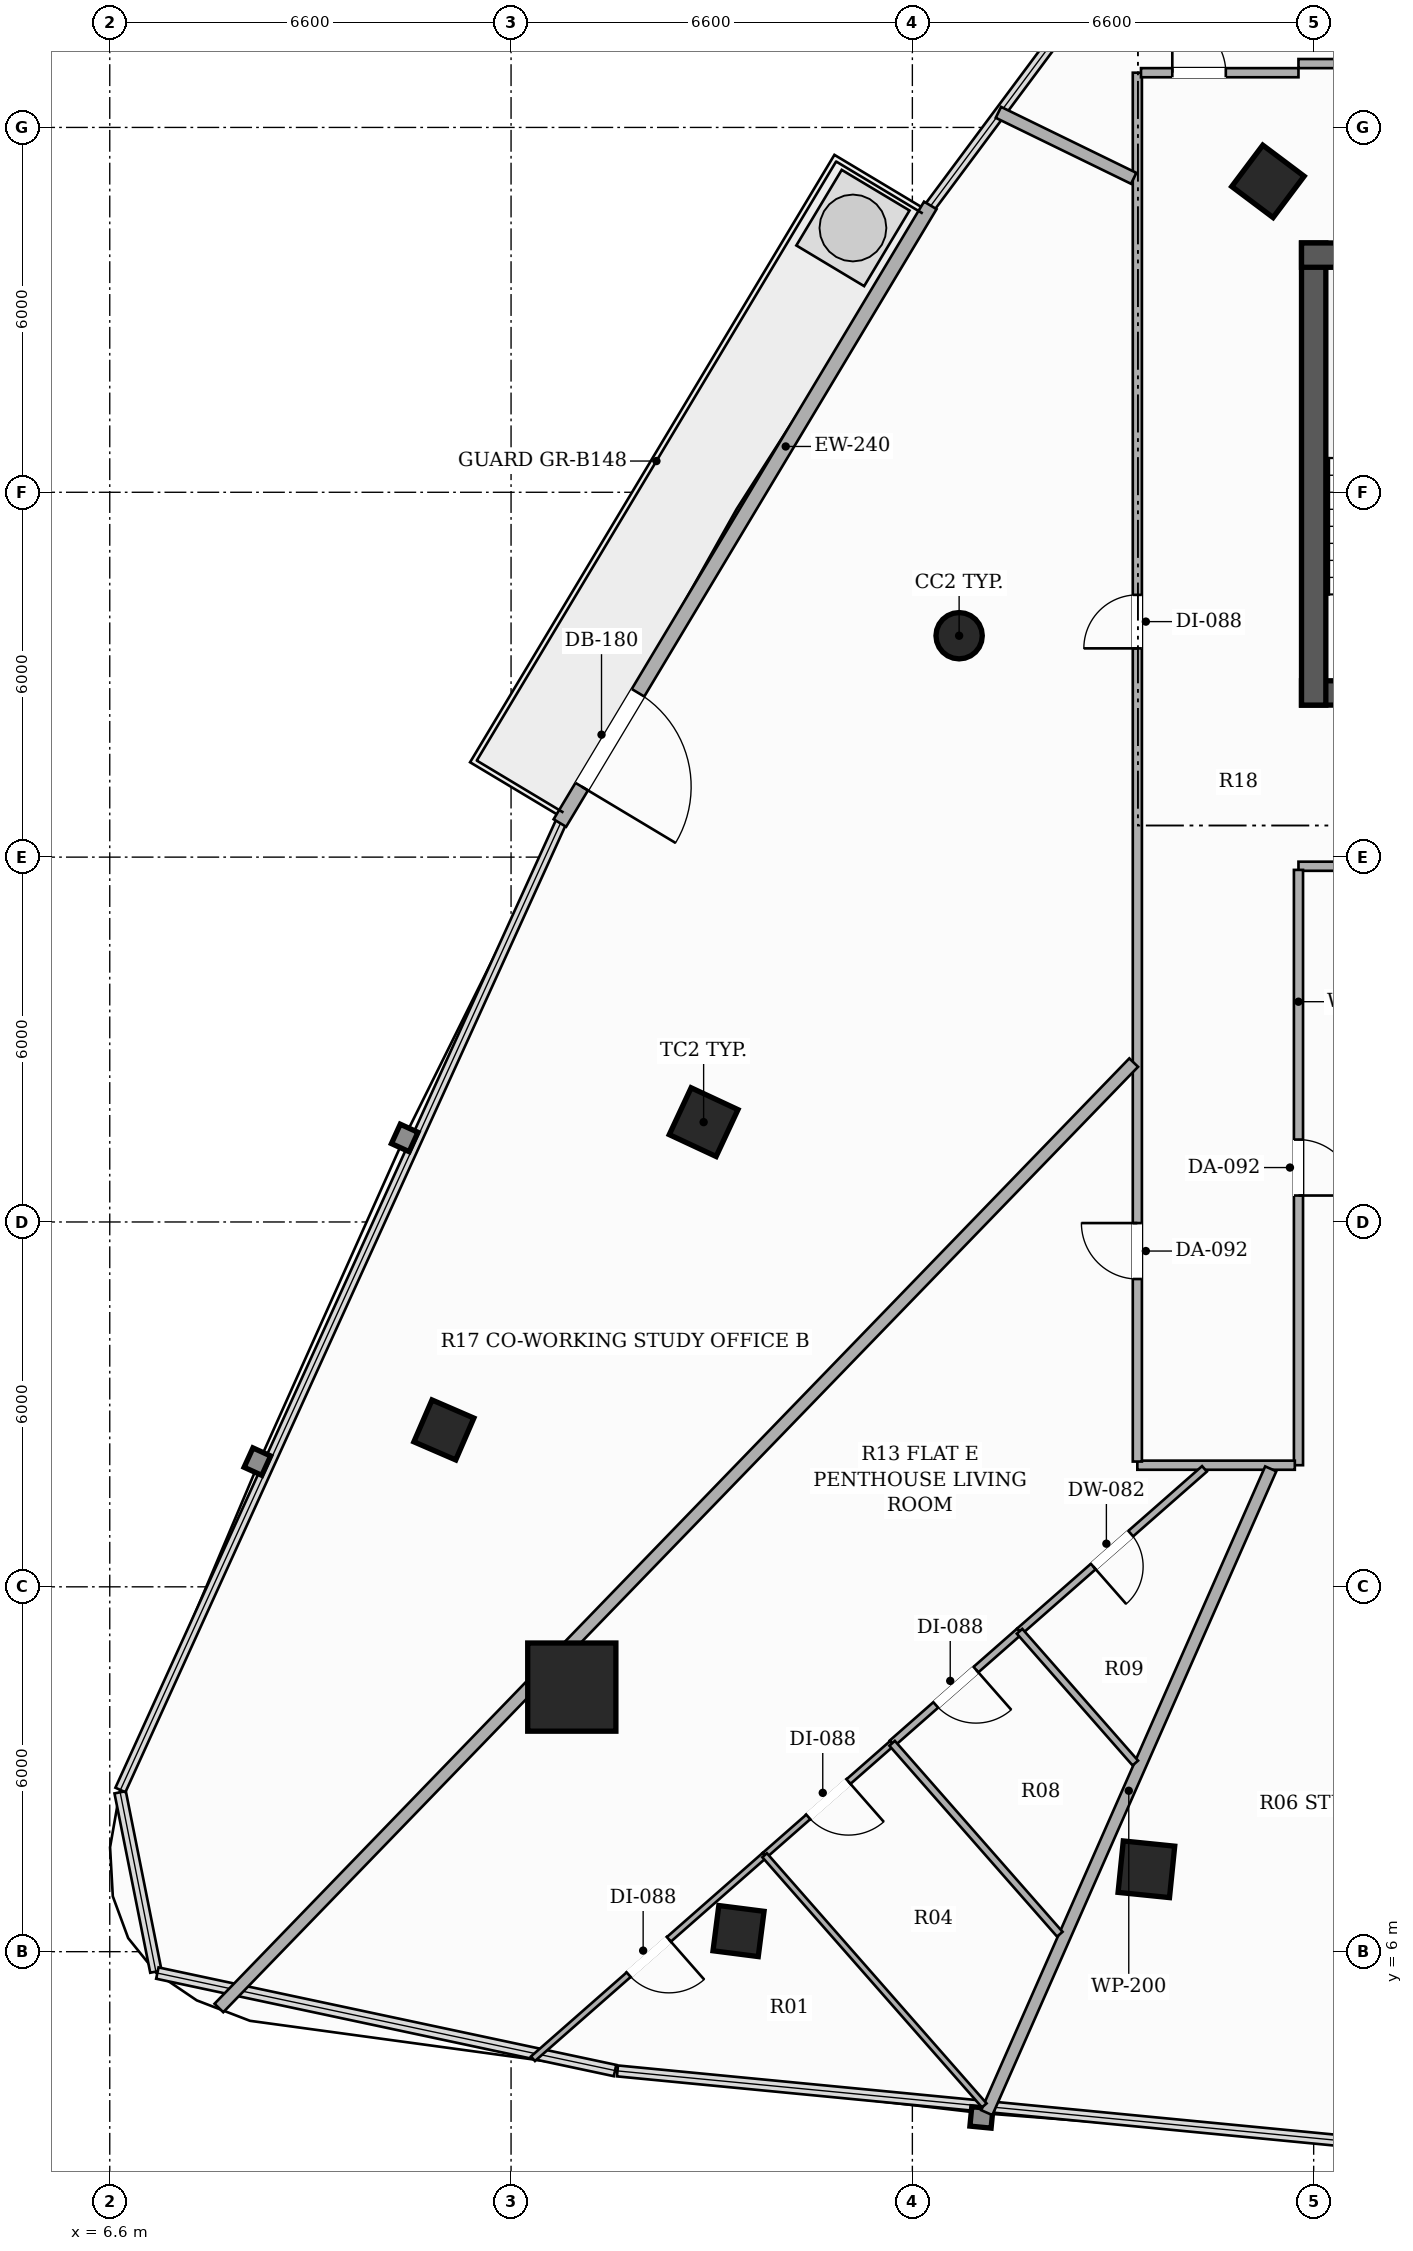
"""IFC4 building model, lengths in metres.
Left out: names, types, materials, properties, quantities, classifications, styles, units other than length and angle.
Written with IfcOpenShell. Run it as: python <this file> out.ifc"""

import sys

from ifc_helpers import new_model, si_unit, direction, frame, frame_2d, origin, origin_2d, place, context, subcontext, project, spatial, rectangle, hollow_rectangle, hollow_circle, extrude, element, fill, save


model = new_model("IFC4")
c1 = context("Model", 3, precision=1e-05, world=origin(), true_north=direction((0.0, 1.0)))
c2 = subcontext(c1, "Body", "Model", "MODEL_VIEW")
j1 = project(units=[si_unit("LENGTHUNIT", "METRE"), si_unit("PLANEANGLEUNIT", "RADIAN")], contexts=[c1])
p1 = place(None, origin())
s1 = spatial("IfcSite", under=j1, at=p1, CompositionType="ELEMENT")
p2 = place(p1, origin())
s2 = spatial("IfcBuilding", under=s1, at=p2, CompositionType="ELEMENT")
p3 = place(p2, frame((0.0, 0.0, 113.3)))
s3 = spatial("IfcBuildingStorey", under=s2, at=p3, CompositionType="ELEMENT", Elevation=113.3)
p4 = place(p3, frame((26.2, 26.7, 0.0), z_axis=(0.0, 0.0, 1.0), x_axis=(1.0, 0.0, 0.0)))
e1 = element("IfcWall", 1, at=p4, inside=s3, PredefinedType="SHEAR", context=c2, shape_type="SweptSolid", body=[
    extrude(rectangle(XDim=13.6, YDim=0.4, at=frame_2d((6.8, 0.0))), origin(), (0.0, 0.0, 1.0), 3.3),
])
p5 = place(p4, frame((4.35, 0.0, 0.0)))
e2 = element("IfcOpeningElement", 2, at=p5, cuts=e1, PredefinedType="OPENING", context=c2, shape_type="SweptSolid", body=[
    extrude(rectangle(XDim=1.05, YDim=2.15, at=frame_2d((0.525, 1.075))), frame((0.0, 0.21, 0.0), z_axis=(0.0, -1.0, 0.0), x_axis=(1.0, 0.0, 0.0)), (0.0, 0.0, 1.0), 0.42),
])
p6 = place(p4, frame((8.3, 0.0, 0.0)))
e3 = element("IfcOpeningElement", 3, at=p6, cuts=e1, PredefinedType="OPENING", context=c2, shape_type="SweptSolid", body=[
    extrude(rectangle(XDim=1.05, YDim=2.15, at=frame_2d((0.525, 1.075))), frame((0.0, 0.21, 0.0), z_axis=(0.0, -1.0, 0.0), x_axis=(1.0, 0.0, 0.0)), (0.0, 0.0, 1.0), 0.42),
])
p7 = place(p3, frame((26.4, 26.5, 0.0), z_axis=(0.0, 0.0, 1.0), x_axis=(0.0, 1.0, 0.0)))
e4 = element("IfcWall", 4, at=p7, inside=s3, PredefinedType="SHEAR", context=c2, shape_type="SweptSolid", body=[
    extrude(rectangle(XDim=7.6, YDim=0.4, at=frame_2d((3.8, 0.0))), origin(), (0.0, 0.0, 1.0), 3.3),
])
p8 = place(p3, frame((26.2, 33.9, 0.0), z_axis=(0.0, 0.0, 1.0), x_axis=(1.0, 0.0, 0.0)))
e5 = element("IfcWall", 5, at=p8, inside=s3, PredefinedType="SHEAR", context=c2, shape_type="SweptSolid", body=[
    extrude(rectangle(XDim=3.68, YDim=0.4, at=frame_2d((1.84, 0.0))), origin(), (0.0, 0.0, 1.0), 3.3),
])
p9 = place(p3, frame((14.199, 10.351, 0.0), z_axis=(0.0, 0.0, 1.0), x_axis=(1.0, 0.0, 0.0)))
e6 = element("IfcColumn", 6, at=p9, inside=s3, PredefinedType="COLUMN", context=c2, shape_type="SweptSolid", body=[
    extrude(hollow_rectangle(XDim=1.45, YDim=1.45, WallThickness=0.045, at=origin_2d()), origin(), (0.0, 0.0, 1.0), 3.3),
])
p10 = place(p3, frame((25.648, 35.113, 0.0), z_axis=(0.0, 0.0, 1.0), x_axis=(0.600420225326, 0.799684658487, 0.0)))
e7 = element("IfcColumn", 7, at=p10, inside=s3, PredefinedType="COLUMN", context=c2, shape_type="SweptSolid", body=[
    extrude(hollow_rectangle(XDim=0.85, YDim=0.85, WallThickness=0.028, at=origin_2d()), origin(), (0.0, 0.0, 1.0), 3.3),
])
p11 = place(p3, frame((20.569, 27.641, 0.0), z_axis=(0.0, 0.0, 1.0), x_axis=(1.0, 0.0, 0.0)))
e8 = element("IfcColumn", 8, at=p11, inside=s3, PredefinedType="COLUMN", context=c2, shape_type="SweptSolid", body=[
    extrude(hollow_circle(Radius=0.381, WallThickness=0.022, at=origin_2d()), origin(), (0.0, 0.0, 1.0), 3.3),
])
for number, where, z_axis, x_axis in (
    (9, (16.367, 19.642, 0.0), (0.0, 0.0, 1.0), (0.423, 0.906, 0.0)),
    (10, (23.649, 7.355, 0.0), (0.0, 0.0, 1.0), (-0.995, 0.101, 0.0)),
):
    element("IfcColumn", number, at=place(p3, frame(where, z_axis=z_axis, x_axis=x_axis)), inside=s3, PredefinedType="COLUMN", context=c2, shape_type="SweptSolid", body=[
        extrude(hollow_rectangle(XDim=0.85, YDim=0.85, WallThickness=0.028, at=origin_2d()), origin(), (0.0, 0.0, 1.0), 3.3),
    ])
for number, where, z_axis, x_axis in (
    (11, (12.095, 14.58, 0.0), (0.0, 0.0, 1.0), (0.397, 0.918, 0.0)),
    (12, (16.941, 6.339, 0.0), (0.0, 0.0, 1.0), (-0.992, 0.127, 0.0)),
):
    element("IfcColumn", number, at=place(p3, frame(where, z_axis=z_axis, x_axis=x_axis)), inside=s3, PredefinedType="COLUMN", context=c2, shape_type="SweptSolid", body=[
        extrude(hollow_rectangle(XDim=0.75, YDim=0.75, WallThickness=0.025, at=origin_2d()), origin(), (0.0, 0.0, 1.0), 3.3),
    ])
p12 = place(p3, frame((20.095, 34.718, 0.0), z_axis=(0.0, 0.0, 1.0), x_axis=(-0.514362369366, -0.857572943242, 0.0)))
e13 = element("IfcWall", 13, at=p12, inside=s3, PredefinedType="SOLIDWALL", context=c2, shape_type="SweptSolid", body=[
    extrude(rectangle(XDim=11.844, YDim=0.24, at=frame_2d((5.922, 0.0))), origin(), (0.0, 0.0, 1.0), 2.624),
])
p13 = place(p12, frame((9.346, 0.0, 0.0)))
e14 = element("IfcOpeningElement", 14, at=p13, cuts=e13, PredefinedType="OPENING", context=c2, shape_type="SweptSolid", body=[
    extrude(rectangle(XDim=1.8, YDim=2.2, at=frame_2d((0.9, 1.1))), frame((0.0, 0.13, 0.0), z_axis=(0.0, -1.0, 0.0), x_axis=(1.0, 0.0, 0.0)), (0.0, 0.0, 1.0), 0.26),
])
p14 = place(p3, frame((31.775, 23.85, 0.0), z_axis=(0.0, 0.0, 1.0), x_axis=(-1.0, 0.0, 0.0)))
e15 = element("IfcWall", 15, at=p14, inside=s3, PredefinedType="PARTITIONING", context=c2, shape_type="SweptSolid", body=[
    extrude(rectangle(XDim=5.625, YDim=0.15, at=frame_2d((2.812, 0.0))), origin(), (0.0, 0.0, 1.0), 2.721),
])
p15 = place(p3, frame((26.15, 23.79, 0.0), z_axis=(0.0, 0.0, 1.0), x_axis=(0.0, -1.0, 0.0)))
e16 = element("IfcWall", 16, at=p15, inside=s3, PredefinedType="PARTITIONING", context=c2, shape_type="SweptSolid", body=[
    extrude(rectangle(XDim=9.79, YDim=0.15, at=frame_2d((4.895, 0.0))), origin(), (0.0, 0.0, 1.0), 2.721),
])
p16 = place(p15, frame((4.435, 0.0, 0.0)))
e17 = element("IfcOpeningElement", 17, at=p16, cuts=e16, PredefinedType="OPENING", context=c2, shape_type="SweptSolid", body=[
    extrude(rectangle(XDim=0.92, YDim=2.15, at=frame_2d((0.46, 1.075))), frame((0.0, 0.085, 0.0), z_axis=(0.0, -1.0, 0.0), x_axis=(1.0, 0.0, 0.0)), (0.0, 0.0, 1.0), 0.17),
])
p17 = place(p3, frame((26.09, 14.0, 0.0), z_axis=(0.0, 0.0, 1.0), x_axis=(-1.0, 0.0, 0.0)))
e18 = element("IfcWall", 18, at=p17, inside=s3, PredefinedType="PARTITIONING", context=c2, shape_type="SweptSolid", body=[
    extrude(rectangle(XDim=2.59, YDim=0.15, at=frame_2d((1.295, 0.0))), origin(), (0.0, 0.0, 1.0), 2.721),
])
p18 = place(p3, frame((23.5, 14.06, 0.0), z_axis=(0.0, 0.0, 1.0), x_axis=(0.0, 1.0, 0.0)))
e19 = element("IfcWall", 19, at=p18, inside=s3, PredefinedType="PARTITIONING", context=c2, shape_type="SweptSolid", body=[
    extrude(rectangle(XDim=22.84, YDim=0.15, at=frame_2d((11.42, 0.0))), origin(), (0.0, 0.0, 1.0), 2.413),
])
p19 = place(p18, frame((13.373, 0.0, 0.0)))
e20 = element("IfcOpeningElement", 20, at=p19, cuts=e19, PredefinedType="OPENING", context=c2, shape_type="SweptSolid", body=[
    extrude(rectangle(XDim=0.88, YDim=2.1, at=frame_2d((0.44, 1.05))), frame((0.0, 0.085, 0.0), z_axis=(0.0, -1.0, 0.0), x_axis=(1.0, 0.0, 0.0)), (0.0, 0.0, 1.0), 0.17),
])
p20 = place(p18, frame((3.002, 0.0, 0.0)))
e21 = element("IfcOpeningElement", 21, at=p20, cuts=e19, PredefinedType="OPENING", context=c2, shape_type="SweptSolid", body=[
    extrude(rectangle(XDim=0.92, YDim=2.15, at=frame_2d((0.46, 1.075))), frame((0.0, 0.085, 0.0), z_axis=(0.0, -1.0, 0.0), x_axis=(1.0, 0.0, 0.0)), (0.0, 0.0, 1.0), 0.17),
])
p21 = place(p3, frame((23.56, 36.9, 0.0), z_axis=(0.0, 0.0, 1.0), x_axis=(1.0, 0.0, 0.0)))
e22 = element("IfcWall", 22, at=p21, inside=s3, PredefinedType="PARTITIONING", context=c2, shape_type="SweptSolid", body=[
    extrude(rectangle(XDim=2.59, YDim=0.15, at=frame_2d((1.295, 0.0))), origin(), (0.0, 0.0, 1.0), 2.413),
])
p22 = place(p21, frame((0.515, 0.0, 0.0)))
e23 = element("IfcOpeningElement", 23, at=p22, cuts=e22, PredefinedType="OPENING", context=c2, shape_type="SweptSolid", body=[
    extrude(rectangle(XDim=0.88, YDim=2.1, at=frame_2d((0.44, 1.05))), frame((0.0, 0.085, 0.0), z_axis=(0.0, -1.0, 0.0), x_axis=(1.0, 0.0, 0.0)), (0.0, 0.0, 1.0), 0.17),
])
p23 = place(p3, frame((26.15, 37.05, 0.0), z_axis=(0.0, 0.0, 1.0), x_axis=(1.0, 0.0, 0.0)))
e24 = element("IfcWall", 24, at=p23, inside=s3, PredefinedType="PARTITIONING", context=c2, shape_type="SweptSolid", body=[
    extrude(rectangle(XDim=2.0, YDim=0.15, at=frame_2d((1.0, 0.0))), origin(), (0.0, 0.0, 1.0), 2.413),
])
p24 = place(p3, frame((21.024, 3.353, 0.0), z_axis=(0.0, 0.0, 1.0), x_axis=(0.403601766718, 0.914934759369, 0.0)))
e25 = element("IfcWall", 25, at=p24, inside=s3, PredefinedType="PARTITIONING", context=c2, shape_type="SweptSolid", body=[
    extrude(rectangle(XDim=11.571, YDim=0.2, at=frame_2d((5.786, 0.0))), origin(), (0.0, 0.0, 1.0), 2.413),
])
p25 = place(p3, frame((23.44, 20.621, 0.0), z_axis=(0.0, 0.0, 1.0), x_axis=(-0.695405261367, -0.718617786075, 0.0)))
e26 = element("IfcWall", 26, at=p25, inside=s3, PredefinedType="PARTITIONING", context=c2, shape_type="SweptSolid", body=[
    extrude(rectangle(XDim=21.635, YDim=0.2, at=frame_2d((10.817, 0.0))), origin(), (0.0, 0.0, 1.0), 2.413),
])
p26 = place(p3, frame((21.215, 36.248, 0.0), z_axis=(0.0, 0.0, 1.0), x_axis=(0.898821522371, -0.438314808012, 0.0)))
e27 = element("IfcWall", 27, at=p26, inside=s3, PredefinedType="PARTITIONING", context=c2, shape_type="SweptSolid", body=[
    extrude(rectangle(XDim=2.475, YDim=0.2, at=frame_2d((1.238, 0.0))), origin(), (0.0, 0.0, 1.0), 3.06),
])
p27 = place(p3, frame((24.604, 13.94, 0.0), z_axis=(0.0, 0.0, 1.0), x_axis=(-0.751349767919, -0.659904179595, 0.0)))
e28 = element("IfcWall", 28, at=p27, inside=s3, PredefinedType="PARTITIONING", context=c2, shape_type="SweptSolid", body=[
    extrude(rectangle(XDim=4.047, YDim=0.12, at=frame_2d((2.024, 0.0))), origin(), (0.0, 0.0, 1.0), 2.721),
])
p28 = place(p27, frame((1.614, 0.0, 0.0)))
e29 = element("IfcOpeningElement", 29, at=p28, cuts=e28, PredefinedType="OPENING", context=c2, shape_type="SweptSolid", body=[
    extrude(rectangle(XDim=0.82, YDim=2.1, at=frame_2d((0.41, 1.05))), frame((0.0, 0.07, 0.0), z_axis=(0.0, -1.0, 0.0), x_axis=(1.0, 0.0, 0.0)), (0.0, 0.0, 1.0), 0.14),
])
p29 = place(p3, frame((21.563, 11.269, 0.0), z_axis=(0.0, 0.0, 1.0), x_axis=(-0.751138604229, -0.660144527537, 0.0)))
e30 = element("IfcWall", 30, at=p29, inside=s3, PredefinedType="PARTITIONING", context=c2, shape_type="SweptSolid", body=[
    extrude(rectangle(XDim=2.79, YDim=0.12, at=frame_2d((1.395, 0.0))), origin(), (0.0, 0.0, 1.0), 2.721),
])
p30 = place(p29, frame((0.955, 0.0, 0.0)))
e31 = element("IfcOpeningElement", 31, at=p30, cuts=e30, PredefinedType="OPENING", context=c2, shape_type="SweptSolid", body=[
    extrude(rectangle(XDim=0.88, YDim=2.1, at=frame_2d((0.44, 1.05))), frame((0.0, 0.07, 0.0), z_axis=(0.0, -1.0, 0.0), x_axis=(1.0, 0.0, 0.0)), (0.0, 0.0, 1.0), 0.14),
])
p31 = place(p3, frame((17.37, 7.586, 0.0), z_axis=(0.0, 0.0, 1.0), x_axis=(-0.751292920188, -0.659968899324, 0.0)))
e32 = element("IfcWall", 32, at=p31, inside=s3, PredefinedType="PARTITIONING", context=c2, shape_type="SweptSolid", body=[
    extrude(rectangle(XDim=5.071, YDim=0.1, at=frame_2d((2.536, 0.0))), origin(), (0.0, 0.0, 1.0), 2.413),
])
p32 = place(p31, frame((2.096, 0.0, 0.0)))
e33 = element("IfcOpeningElement", 33, at=p32, cuts=e32, PredefinedType="OPENING", context=c2, shape_type="SweptSolid", body=[
    extrude(rectangle(XDim=0.88, YDim=2.1, at=frame_2d((0.44, 1.05))), frame((0.0, 0.06, 0.0), z_axis=(0.0, -1.0, 0.0), x_axis=(1.0, 0.0, 0.0)), (0.0, 0.0, 1.0), 0.12),
])
p33 = place(p3, frame((19.467, 9.427, 0.0), z_axis=(0.0, 0.0, 1.0), x_axis=(-0.751464558758, -0.659773458795, 0.0)))
e34 = element("IfcWall", 34, at=p33, inside=s3, PredefinedType="PARTITIONING", context=c2, shape_type="SweptSolid", body=[
    extrude(rectangle(XDim=2.791, YDim=0.1, at=frame_2d((1.395, 0.0))), origin(), (0.0, 0.0, 1.0), 2.721),
])
p34 = place(p33, frame((0.955, 0.0, 0.0)))
e35 = element("IfcOpeningElement", 35, at=p34, cuts=e34, PredefinedType="OPENING", context=c2, shape_type="SweptSolid", body=[
    extrude(rectangle(XDim=0.88, YDim=2.1, at=frame_2d((0.44, 1.05))), frame((0.0, 0.06, 0.0), z_axis=(0.0, -1.0, 0.0), x_axis=(1.0, 0.0, 0.0)), (0.0, 0.0, 1.0), 0.12),
])
p35 = place(p3, frame((23.467, 9.102, 0.0), z_axis=(0.0, 0.0, 1.0), x_axis=(-0.660061062947, 0.751211949573, 0.0)))
e36 = element("IfcWall", 36, at=p35, inside=s3, PredefinedType="PARTITIONING", context=c2, shape_type="SweptSolid", body=[
    extrude(rectangle(XDim=2.885, YDim=0.12, at=frame_2d((1.442, 0.0))), origin(), (0.0, 0.0, 1.0), 2.721),
])
p36 = place(p3, frame((22.225, 6.287, 0.0), z_axis=(0.0, 0.0, 1.0), x_axis=(-0.659946783628, 0.751312347016, 0.0)))
e37 = element("IfcWall", 37, at=p36, inside=s3, PredefinedType="PARTITIONING", context=c2, shape_type="SweptSolid", body=[
    extrude(rectangle(XDim=4.179, YDim=0.12, at=frame_2d((2.09, 0.0))), origin(), (0.0, 0.0, 1.0), 2.413),
])
p37 = place(p3, frame((17.37, 7.586, 0.0), z_axis=(0.0, 0.0, 1.0), x_axis=(0.659851528992, -0.751396007234, 0.0)))
e38 = element("IfcWall", 38, at=p37, inside=s3, PredefinedType="PARTITIONING", context=c2, shape_type="SweptSolid", body=[
    extrude(rectangle(XDim=5.475, YDim=0.1, at=frame_2d((2.738, 0.0))), origin(), (0.0, 0.0, 1.0), 2.413),
])
p38 = place(p13, origin())
e39 = element("IfcDoor", 39, at=p38, inside=s3, OperationType="SINGLE_SWING_RIGHT", PredefinedType="DOOR", context=c2, shape_type="SweptSolid", body=[
    extrude(rectangle(XDim=1.8, YDim=2.2, at=frame_2d((0.9, 1.1))), frame((0.0, 0.025, 0.0), z_axis=(0.0, -1.0, 0.0), x_axis=(1.0, 0.0, 0.0)), (0.0, 0.0, 1.0), 0.05),
])
fill(e14, e39)
p39 = place(p16, origin())
e40 = element("IfcDoor", 40, at=p39, inside=s3, OperationType="SINGLE_SWING_RIGHT", PredefinedType="DOOR", context=c2, shape_type="SweptSolid", body=[
    extrude(rectangle(XDim=0.92, YDim=2.15, at=frame_2d((0.46, 1.075))), frame((0.0, 0.025, 0.0), z_axis=(0.0, -1.0, 0.0), x_axis=(1.0, 0.0, 0.0)), (0.0, 0.0, 1.0), 0.05),
])
fill(e17, e40)
p40 = place(p19, origin())
e41 = element("IfcDoor", 41, at=p40, inside=s3, OperationType="SINGLE_SWING_LEFT", PredefinedType="DOOR", context=c2, shape_type="SweptSolid", body=[
    extrude(rectangle(XDim=0.88, YDim=2.1, at=frame_2d((0.44, 1.05))), frame((0.0, 0.025, 0.0), z_axis=(0.0, -1.0, 0.0), x_axis=(1.0, 0.0, 0.0)), (0.0, 0.0, 1.0), 0.05),
])
fill(e20, e41)
p41 = place(p20, origin())
e42 = element("IfcDoor", 42, at=p41, inside=s3, OperationType="SINGLE_SWING_RIGHT", PredefinedType="DOOR", context=c2, shape_type="SweptSolid", body=[
    extrude(rectangle(XDim=0.92, YDim=2.15, at=frame_2d((0.46, 1.075))), frame((0.0, 0.025, 0.0), z_axis=(0.0, -1.0, 0.0), x_axis=(1.0, 0.0, 0.0)), (0.0, 0.0, 1.0), 0.05),
])
fill(e21, e42)
p42 = place(p28, origin())
e43 = element("IfcDoor", 43, at=p42, inside=s3, OperationType="SINGLE_SWING_RIGHT", PredefinedType="DOOR", context=c2, shape_type="SweptSolid", body=[
    extrude(rectangle(XDim=0.82, YDim=2.1, at=frame_2d((0.41, 1.05))), frame((0.0, 0.025, 0.0), z_axis=(0.0, -1.0, 0.0), x_axis=(1.0, 0.0, 0.0)), (0.0, 0.0, 1.0), 0.05),
])
fill(e29, e43)
p43 = place(p30, origin())
e44 = element("IfcDoor", 44, at=p43, inside=s3, OperationType="SINGLE_SWING_LEFT", PredefinedType="DOOR", context=c2, shape_type="SweptSolid", body=[
    extrude(rectangle(XDim=0.88, YDim=2.1, at=frame_2d((0.44, 1.05))), frame((0.0, 0.025, 0.0), z_axis=(0.0, -1.0, 0.0), x_axis=(1.0, 0.0, 0.0)), (0.0, 0.0, 1.0), 0.05),
])
fill(e31, e44)
p44 = place(p32, origin())
e45 = element("IfcDoor", 45, at=p44, inside=s3, OperationType="SINGLE_SWING_LEFT", PredefinedType="DOOR", context=c2, shape_type="SweptSolid", body=[
    extrude(rectangle(XDim=0.88, YDim=2.1, at=frame_2d((0.44, 1.05))), frame((0.0, 0.025, 0.0), z_axis=(0.0, -1.0, 0.0), x_axis=(1.0, 0.0, 0.0)), (0.0, 0.0, 1.0), 0.05),
])
fill(e33, e45)
p45 = place(p34, origin())
e46 = element("IfcDoor", 46, at=p45, inside=s3, OperationType="SINGLE_SWING_LEFT", PredefinedType="DOOR", context=c2, shape_type="SweptSolid", body=[
    extrude(rectangle(XDim=0.88, YDim=2.1, at=frame_2d((0.44, 1.05))), frame((0.0, 0.025, 0.0), z_axis=(0.0, -1.0, 0.0), x_axis=(1.0, 0.0, 0.0)), (0.0, 0.0, 1.0), 0.05),
])
fill(e35, e46)
p46 = place(p22, origin())
e47 = element("IfcDoor", 47, at=p46, inside=s3, OperationType="SINGLE_SWING_LEFT", PredefinedType="DOOR", context=c2, shape_type="SweptSolid", body=[
    extrude(rectangle(XDim=0.88, YDim=2.1, at=frame_2d((0.44, 1.05))), frame((0.0, 0.025, 0.0), z_axis=(0.0, -1.0, 0.0), x_axis=(1.0, 0.0, 0.0)), (0.0, 0.0, 1.0), 0.05),
])
fill(e23, e47)
save(model, sys.argv[1])
